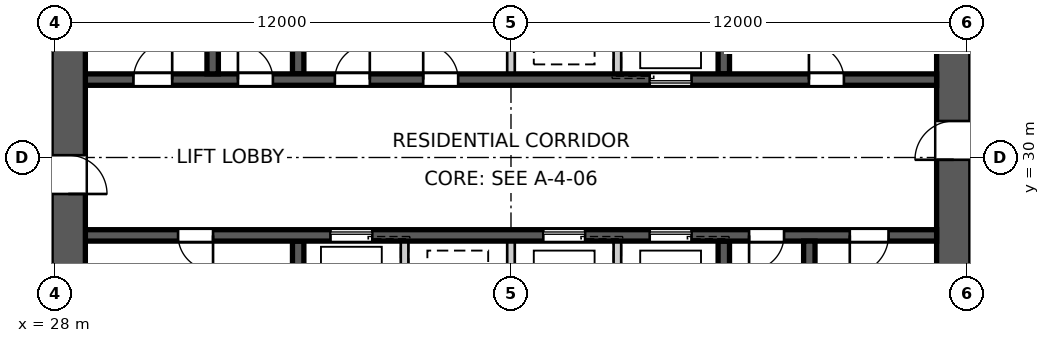
"""IFC4 building model, lengths in metres.
Left out: names, types, materials, properties, quantities, classifications, styles, units other than length and angle.
Written with IfcOpenShell. Run it as: python <this file> out.ifc"""

import sys

from ifc_helpers import new_model, si_unit, direction, frame, frame_2d, origin, place, context, subcontext, project, spatial, polyline, rectangle, outline, extrude, element, fill, save


model = new_model("IFC4")
c1 = context("Model", 3, precision=1e-05, world=origin(), true_north=direction((0.0, 1.0)))
c2 = subcontext(c1, "Body", "Model", "MODEL_VIEW")
j1 = project(units=[si_unit("LENGTHUNIT", "METRE"), si_unit("PLANEANGLEUNIT", "RADIAN")], contexts=[c1])
p1 = place(None, origin())
s1 = spatial("IfcSite", under=j1, at=p1, CompositionType="ELEMENT")
p2 = place(p1, origin())
s2 = spatial("IfcBuilding", under=s1, at=p2, CompositionType="ELEMENT")
p3 = place(p2, frame((0.0, 0.0, 154.0)))
s3 = spatial("IfcBuildingStorey", under=s2, at=p3, CompositionType="ELEMENT", Elevation=154.0)
p4 = place(p3, frame((51.65, 18.8, 0.0), z_axis=(0.0, 0.0, 1.0), x_axis=(0.0, 1.0, 0.0)))
e1 = element("IfcWall", 1, at=p4, inside=s3, PredefinedType="SHEAR", context=c2, shape_type="SweptSolid", body=[
    extrude(outline(polyline([(0.0, -0.45), (22.4, -0.45), (22.4, -0.025), (22.85, -0.025), (22.85, 0.025), (22.4, 0.025), (22.4, 0.45), (0.0, 0.45), (0.0, 0.025), (-0.45, 0.025), (-0.45, -0.025), (0.0, -0.025), (0.0, -0.45)])), origin(), (0.0, 0.0, 1.0), 3.4),
])
p5 = place(p4, frame((11.14, 0.0, 0.0)))
e2 = element("IfcOpeningElement", 2, at=p5, cuts=e1, PredefinedType="OPENING", context=c2, shape_type="SweptSolid", body=[
    extrude(rectangle(XDim=1.02, YDim=2.4, at=frame_2d((0.51, 1.2))), frame((0.0, 0.46, 0.0), z_axis=(0.0, -1.0, 0.0), x_axis=(1.0, 0.0, 0.0)), (0.0, 0.0, 1.0), 0.92),
])
p6 = place(p3, frame((28.35, 41.2, 0.0), z_axis=(0.0, 0.0, 1.0), x_axis=(0.0, -1.0, 0.0)))
e3 = element("IfcWall", 3, at=p6, inside=s3, PredefinedType="SHEAR", context=c2, shape_type="SweptSolid", body=[
    extrude(outline(polyline([(0.0, -0.45), (22.4, -0.45), (22.4, -0.025), (22.85, -0.025), (22.85, 0.025), (22.4, 0.025), (22.4, 0.45), (0.0, 0.45), (0.0, 0.025), (-0.45, 0.025), (-0.45, -0.025), (0.0, -0.025), (0.0, -0.45)])), origin(), (0.0, 0.0, 1.0), 3.4),
])
p7 = place(p6, frame((11.14, 0.0, 0.0)))
e4 = element("IfcOpeningElement", 4, at=p7, cuts=e3, PredefinedType="OPENING", context=c2, shape_type="SweptSolid", body=[
    extrude(rectangle(XDim=1.02, YDim=2.4, at=frame_2d((0.51, 1.2))), frame((0.0, 0.46, 0.0), z_axis=(0.0, -1.0, 0.0), x_axis=(1.0, 0.0, 0.0)), (0.0, 0.0, 1.0), 0.92),
])
p8 = place(p3, frame((28.8, 32.05, 0.0), z_axis=(0.0, 0.0, 1.0), x_axis=(1.0, 0.0, 0.0)))
e5 = element("IfcWall", 5, at=p8, inside=s3, PredefinedType="SHEAR", context=c2, shape_type="SweptSolid", body=[
    extrude(rectangle(XDim=22.4, YDim=0.3, at=frame_2d((11.2, 0.0))), origin(), (0.0, 0.0, 1.0), 3.4),
])
p9 = place(p8, frame((19.04, 0.0, 0.0)))
e6 = element("IfcOpeningElement", 6, at=p9, cuts=e5, PredefinedType="OPENING", context=c2, shape_type="SweptSolid", body=[
    extrude(rectangle(XDim=0.92, YDim=2.1, at=frame_2d((0.46, 1.05))), frame((0.0, 0.16, 0.0), z_axis=(0.0, -1.0, 0.0), x_axis=(1.0, 0.0, 0.0)), (0.0, 0.0, 1.0), 0.32),
])
p10 = place(p8, frame((1.265, 0.0, 0.0)))
e7 = element("IfcOpeningElement", 7, at=p10, cuts=e5, PredefinedType="OPENING", context=c2, shape_type="SweptSolid", body=[
    extrude(rectangle(XDim=1.02, YDim=2.1, at=frame_2d((0.51, 1.05))), frame((0.0, 0.16, 0.0), z_axis=(0.0, -1.0, 0.0), x_axis=(1.0, 0.0, 0.0)), (0.0, 0.0, 1.0), 0.32),
])
p11 = place(p8, frame((4.015, 0.0, 0.0)))
e8 = element("IfcOpeningElement", 8, at=p11, cuts=e5, PredefinedType="OPENING", context=c2, shape_type="SweptSolid", body=[
    extrude(rectangle(XDim=0.92, YDim=2.1, at=frame_2d((0.46, 1.05))), frame((0.0, 0.16, 0.0), z_axis=(0.0, -1.0, 0.0), x_axis=(1.0, 0.0, 0.0)), (0.0, 0.0, 1.0), 0.32),
])
p12 = place(p8, frame((6.565, 0.0, 0.0)))
e9 = element("IfcOpeningElement", 9, at=p12, cuts=e5, PredefinedType="OPENING", context=c2, shape_type="SweptSolid", body=[
    extrude(rectangle(XDim=0.92, YDim=2.1, at=frame_2d((0.46, 1.05))), frame((0.0, 0.16, 0.0), z_axis=(0.0, -1.0, 0.0), x_axis=(1.0, 0.0, 0.0)), (0.0, 0.0, 1.0), 0.32),
])
p13 = place(p8, frame((8.89, 0.0, 0.0)))
e10 = element("IfcOpeningElement", 10, at=p13, cuts=e5, PredefinedType="OPENING", context=c2, shape_type="SweptSolid", body=[
    extrude(rectangle(XDim=0.92, YDim=2.1, at=frame_2d((0.46, 1.05))), frame((0.0, 0.16, 0.0), z_axis=(0.0, -1.0, 0.0), x_axis=(1.0, 0.0, 0.0)), (0.0, 0.0, 1.0), 0.32),
])
p14 = place(p8, frame((14.85, 0.0, 0.0)))
e11 = element("IfcOpeningElement", 11, at=p14, cuts=e5, PredefinedType="OPENING", context=c2, shape_type="SweptSolid", body=[
    extrude(rectangle(XDim=1.1, YDim=2.1, at=frame_2d((0.55, 1.05))), frame((0.0, 0.16, 0.0), z_axis=(0.0, -1.0, 0.0), x_axis=(1.0, 0.0, 0.0)), (0.0, 0.0, 1.0), 0.32),
])
p15 = place(p3, frame((51.2, 27.95, 0.0), z_axis=(0.0, 0.0, 1.0), x_axis=(-1.0, 0.0, 0.0)))
e12 = element("IfcWall", 12, at=p15, inside=s3, PredefinedType="SHEAR", context=c2, shape_type="SweptSolid", body=[
    extrude(rectangle(XDim=22.4, YDim=0.3, at=frame_2d((11.2, 0.0))), origin(), (0.0, 0.0, 1.0), 3.4),
])
p16 = place(p15, frame((19.04, 0.0, 0.0)))
e13 = element("IfcOpeningElement", 13, at=p16, cuts=e12, PredefinedType="OPENING", context=c2, shape_type="SweptSolid", body=[
    extrude(rectangle(XDim=0.92, YDim=2.1, at=frame_2d((0.46, 1.05))), frame((0.0, 0.16, 0.0), z_axis=(0.0, -1.0, 0.0), x_axis=(1.0, 0.0, 0.0)), (0.0, 0.0, 1.0), 0.32),
])
p17 = place(p15, frame((1.265, 0.0, 0.0)))
e14 = element("IfcOpeningElement", 14, at=p17, cuts=e12, PredefinedType="OPENING", context=c2, shape_type="SweptSolid", body=[
    extrude(rectangle(XDim=1.02, YDim=2.1, at=frame_2d((0.51, 1.05))), frame((0.0, 0.16, 0.0), z_axis=(0.0, -1.0, 0.0), x_axis=(1.0, 0.0, 0.0)), (0.0, 0.0, 1.0), 0.32),
])
p18 = place(p15, frame((4.015, 0.0, 0.0)))
e15 = element("IfcOpeningElement", 15, at=p18, cuts=e12, PredefinedType="OPENING", context=c2, shape_type="SweptSolid", body=[
    extrude(rectangle(XDim=0.92, YDim=2.1, at=frame_2d((0.46, 1.05))), frame((0.0, 0.16, 0.0), z_axis=(0.0, -1.0, 0.0), x_axis=(1.0, 0.0, 0.0)), (0.0, 0.0, 1.0), 0.32),
])
p19 = place(p15, frame((6.45, 0.0, 0.0)))
e16 = element("IfcOpeningElement", 16, at=p19, cuts=e12, PredefinedType="OPENING", context=c2, shape_type="SweptSolid", body=[
    extrude(rectangle(XDim=1.1, YDim=2.1, at=frame_2d((0.55, 1.05))), frame((0.0, 0.16, 0.0), z_axis=(0.0, -1.0, 0.0), x_axis=(1.0, 0.0, 0.0)), (0.0, 0.0, 1.0), 0.32),
])
p20 = place(p15, frame((9.25, 0.0, 0.0)))
e17 = element("IfcOpeningElement", 17, at=p20, cuts=e12, PredefinedType="OPENING", context=c2, shape_type="SweptSolid", body=[
    extrude(rectangle(XDim=1.1, YDim=2.1, at=frame_2d((0.55, 1.05))), frame((0.0, 0.16, 0.0), z_axis=(0.0, -1.0, 0.0), x_axis=(1.0, 0.0, 0.0)), (0.0, 0.0, 1.0), 0.32),
])
p21 = place(p15, frame((14.85, 0.0, 0.0)))
e18 = element("IfcOpeningElement", 18, at=p21, cuts=e12, PredefinedType="OPENING", context=c2, shape_type="SweptSolid", body=[
    extrude(rectangle(XDim=1.1, YDim=2.1, at=frame_2d((0.55, 1.05))), frame((0.0, 0.16, 0.0), z_axis=(0.0, -1.0, 0.0), x_axis=(1.0, 0.0, 0.0)), (0.0, 0.0, 1.0), 0.32),
])
for number, where, z_axis, x_axis in (
    (19, (34.4, 32.2, 0.0), (0.0, 0.0, 1.0), (0.0, 1.0, 0.0)),
    (20, (45.6, 27.8, 0.0), (0.0, 0.0, 1.0), (0.0, -1.0, 0.0)),
):
    element("IfcWall", number, at=place(p3, frame(where, z_axis=z_axis, x_axis=x_axis)), inside=s3, PredefinedType="SHEAR", context=c2, shape_type="SweptSolid", body=[
        extrude(rectangle(XDim=2.8, YDim=0.3, at=frame_2d((1.4, 0.0))), origin(), (0.0, 0.0, 1.0), 3.4),
    ])
for number, where, z_axis, x_axis in (
    (21, (42.8, 27.8, 0.0), (0.0, 0.0, 1.0), (0.0, -1.0, 0.0)),
    (22, (40.0, 32.2, 0.0), (0.0, 0.0, 1.0), (0.0, 1.0, 0.0)),
    (23, (40.0, 27.8, 0.0), (0.0, 0.0, 1.0), (0.0, -1.0, 0.0)),
    (24, (42.8, 32.2, 0.0), (0.0, 0.0, 1.0), (0.0, 1.0, 0.0)),
    (25, (37.2, 27.8, 0.0), (0.0, 0.0, 1.0), (0.0, -1.0, 0.0)),
):
    element("IfcWall", number, at=place(p3, frame(where, z_axis=z_axis, x_axis=x_axis)), inside=s3, PredefinedType="SOLIDWALL", context=c2, shape_type="SweptSolid", body=[
        extrude(rectangle(XDim=2.8, YDim=0.2, at=frame_2d((1.4, 0.0))), origin(), (0.0, 0.0, 1.0), 3.4),
    ])
for number, where, z_axis, x_axis in (
    (26, (45.6, 32.2, 0.0), (0.0, 0.0, 1.0), (0.0, 1.0, 0.0)),
    (27, (34.4, 27.8, 0.0), (0.0, 0.0, 1.0), (0.0, -1.0, 0.0)),
):
    element("IfcWall", number, at=place(p3, frame(where, z_axis=z_axis, x_axis=x_axis)), inside=s3, PredefinedType="SHEAR", context=c2, shape_type="SweptSolid", body=[
        extrude(rectangle(XDim=2.8, YDim=0.3, at=frame_2d((1.4, 0.0))), origin(), (0.0, 0.0, 1.0), 3.4),
    ])
for number, where, z_axis, x_axis in (
    (28, (32.15, 32.2, 0.0), (0.0, 0.0, 1.0), (0.0, 1.0, 0.0)),
    (29, (47.85, 27.8, 0.0), (0.0, 0.0, 1.0), (0.0, -1.0, 0.0)),
):
    element("IfcWall", number, at=place(p3, frame(where, z_axis=z_axis, x_axis=x_axis)), inside=s3, PredefinedType="SHEAR", context=c2, shape_type="SweptSolid", body=[
        extrude(rectangle(XDim=7.7, YDim=0.3, at=frame_2d((3.85, 0.0))), origin(), (0.0, 0.0, 1.0), 3.4),
    ])
p22 = place(p9, origin())
e30 = element("IfcDoor", 30, at=p22, inside=s3, OperationType="SINGLE_SWING_LEFT", PredefinedType="DOOR", context=c2, shape_type="SweptSolid", body=[
    extrude(rectangle(XDim=0.92, YDim=2.1, at=frame_2d((0.46, 1.05))), frame((0.0, 0.025, 0.0), z_axis=(0.0, -1.0, 0.0), x_axis=(1.0, 0.0, 0.0)), (0.0, 0.0, 1.0), 0.05),
])
fill(e6, e30)
p23 = place(p16, origin())
e31 = element("IfcDoor", 31, at=p23, inside=s3, OperationType="SINGLE_SWING_LEFT", PredefinedType="DOOR", context=c2, shape_type="SweptSolid", body=[
    extrude(rectangle(XDim=0.92, YDim=2.1, at=frame_2d((0.46, 1.05))), frame((0.0, 0.025, 0.0), z_axis=(0.0, -1.0, 0.0), x_axis=(1.0, 0.0, 0.0)), (0.0, 0.0, 1.0), 0.05),
])
fill(e13, e31)
p24 = place(p17, origin())
e32 = element("IfcDoor", 32, at=p24, inside=s3, OperationType="SINGLE_SWING_RIGHT", PredefinedType="DOOR", context=c2, shape_type="SweptSolid", body=[
    extrude(rectangle(XDim=1.02, YDim=2.1, at=frame_2d((0.51, 1.05))), frame((0.0, 0.025, 0.0), z_axis=(0.0, -1.0, 0.0), x_axis=(1.0, 0.0, 0.0)), (0.0, 0.0, 1.0), 0.05),
])
fill(e14, e32)
p25 = place(p10, origin())
e33 = element("IfcDoor", 33, at=p25, inside=s3, OperationType="SINGLE_SWING_RIGHT", PredefinedType="DOOR", context=c2, shape_type="SweptSolid", body=[
    extrude(rectangle(XDim=1.02, YDim=2.1, at=frame_2d((0.51, 1.05))), frame((0.0, 0.025, 0.0), z_axis=(0.0, -1.0, 0.0), x_axis=(1.0, 0.0, 0.0)), (0.0, 0.0, 1.0), 0.05),
])
fill(e7, e33)
p26 = place(p11, origin())
e34 = element("IfcDoor", 34, at=p26, inside=s3, OperationType="SINGLE_SWING_LEFT", PredefinedType="DOOR", context=c2, shape_type="SweptSolid", body=[
    extrude(rectangle(XDim=0.92, YDim=2.1, at=frame_2d((0.46, 1.05))), frame((0.0, 0.025, 0.0), z_axis=(0.0, -1.0, 0.0), x_axis=(1.0, 0.0, 0.0)), (0.0, 0.0, 1.0), 0.05),
])
fill(e8, e34)
p27 = place(p18, origin())
e35 = element("IfcDoor", 35, at=p27, inside=s3, OperationType="SINGLE_SWING_RIGHT", PredefinedType="DOOR", context=c2, shape_type="SweptSolid", body=[
    extrude(rectangle(XDim=0.92, YDim=2.1, at=frame_2d((0.46, 1.05))), frame((0.0, 0.025, 0.0), z_axis=(0.0, -1.0, 0.0), x_axis=(1.0, 0.0, 0.0)), (0.0, 0.0, 1.0), 0.05),
])
fill(e15, e35)
p28 = place(p12, origin())
e36 = element("IfcDoor", 36, at=p28, inside=s3, OperationType="SINGLE_SWING_RIGHT", PredefinedType="DOOR", context=c2, shape_type="SweptSolid", body=[
    extrude(rectangle(XDim=0.92, YDim=2.1, at=frame_2d((0.46, 1.05))), frame((0.0, 0.025, 0.0), z_axis=(0.0, -1.0, 0.0), x_axis=(1.0, 0.0, 0.0)), (0.0, 0.0, 1.0), 0.05),
])
fill(e9, e36)
p29 = place(p13, origin())
e37 = element("IfcDoor", 37, at=p29, inside=s3, OperationType="SINGLE_SWING_LEFT", PredefinedType="DOOR", context=c2, shape_type="SweptSolid", body=[
    extrude(rectangle(XDim=0.92, YDim=2.1, at=frame_2d((0.46, 1.05))), frame((0.0, 0.025, 0.0), z_axis=(0.0, -1.0, 0.0), x_axis=(1.0, 0.0, 0.0)), (0.0, 0.0, 1.0), 0.05),
])
fill(e10, e37)
p30 = place(p5, origin())
e38 = element("IfcDoor", 38, at=p30, inside=s3, OperationType="SINGLE_SWING_LEFT", PredefinedType="DOOR", context=c2, shape_type="SweptSolid", body=[
    extrude(rectangle(XDim=1.02, YDim=2.4, at=frame_2d((0.51, 1.2))), frame((0.0, 0.025, 0.0), z_axis=(0.0, -1.0, 0.0), x_axis=(1.0, 0.0, 0.0)), (0.0, 0.0, 1.0), 0.05),
])
fill(e2, e38)
p31 = place(p7, origin())
e39 = element("IfcDoor", 39, at=p31, inside=s3, OperationType="SINGLE_SWING_RIGHT", PredefinedType="DOOR", context=c2, shape_type="SweptSolid", body=[
    extrude(rectangle(XDim=1.02, YDim=2.4, at=frame_2d((0.51, 1.2))), frame((0.0, 0.025, 0.0), z_axis=(0.0, -1.0, 0.0), x_axis=(1.0, 0.0, 0.0)), (0.0, 0.0, 1.0), 0.05),
])
fill(e4, e39)
p32 = place(p19, origin())
e40 = element("IfcDoor", 40, at=p32, inside=s3, OperationType="SLIDING_TO_LEFT", PredefinedType="DOOR", context=c2, shape_type="SweptSolid", body=[
    extrude(rectangle(XDim=1.1, YDim=2.1, at=frame_2d((0.55, 1.05))), frame((0.0, 0.025, 0.0), z_axis=(0.0, -1.0, 0.0), x_axis=(1.0, 0.0, 0.0)), (0.0, 0.0, 1.0), 0.05),
])
fill(e16, e40)
p33 = place(p20, origin())
e41 = element("IfcDoor", 41, at=p33, inside=s3, OperationType="SLIDING_TO_LEFT", PredefinedType="DOOR", context=c2, shape_type="SweptSolid", body=[
    extrude(rectangle(XDim=1.1, YDim=2.1, at=frame_2d((0.55, 1.05))), frame((0.0, 0.025, 0.0), z_axis=(0.0, -1.0, 0.0), x_axis=(1.0, 0.0, 0.0)), (0.0, 0.0, 1.0), 0.05),
])
fill(e17, e41)
p34 = place(p14, origin())
e42 = element("IfcDoor", 42, at=p34, inside=s3, OperationType="SLIDING_TO_LEFT", PredefinedType="DOOR", context=c2, shape_type="SweptSolid", body=[
    extrude(rectangle(XDim=1.1, YDim=2.1, at=frame_2d((0.55, 1.05))), frame((0.0, 0.025, 0.0), z_axis=(0.0, -1.0, 0.0), x_axis=(1.0, 0.0, 0.0)), (0.0, 0.0, 1.0), 0.05),
])
fill(e11, e42)
p35 = place(p21, origin())
e43 = element("IfcDoor", 43, at=p35, inside=s3, OperationType="SLIDING_TO_LEFT", PredefinedType="DOOR", context=c2, shape_type="SweptSolid", body=[
    extrude(rectangle(XDim=1.1, YDim=2.1, at=frame_2d((0.55, 1.05))), frame((0.0, 0.025, 0.0), z_axis=(0.0, -1.0, 0.0), x_axis=(1.0, 0.0, 0.0)), (0.0, 0.0, 1.0), 0.05),
])
fill(e18, e43)
save(model, sys.argv[1])
